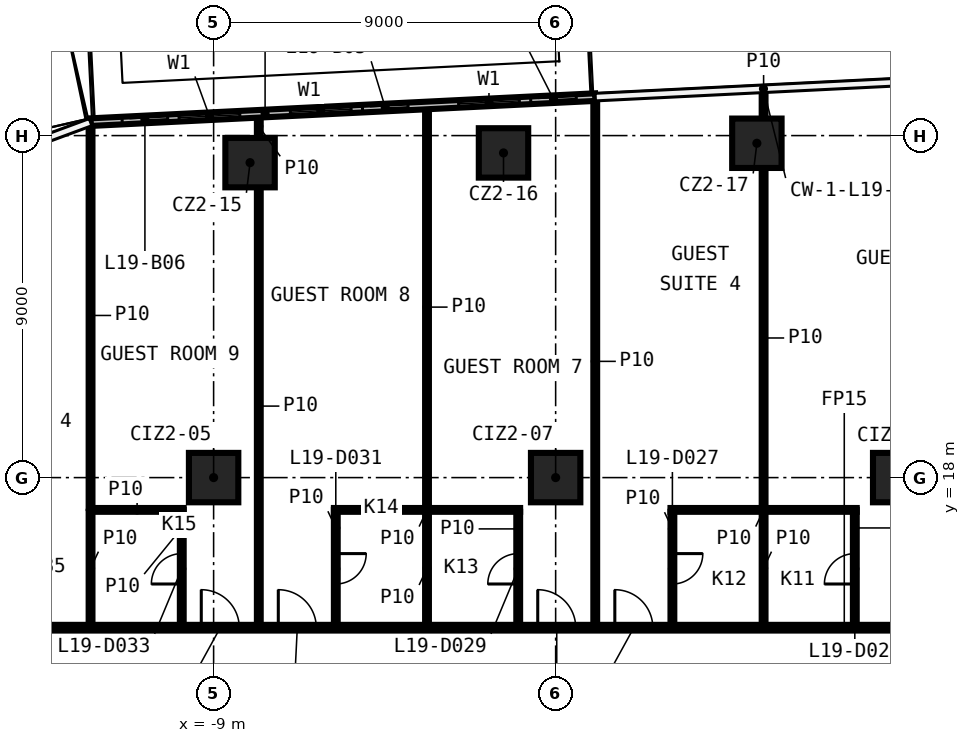
"""IFC4 building model, lengths in metres.
Left out: names, types, materials, properties, quantities, classifications, styles, units other than length and angle.
Written with IfcOpenShell. Run it as: python <this file> out.ifc"""

import sys

from ifc_helpers import new_model, si_unit, direction, frame, frame_2d, origin, origin_2d, place, context, subcontext, project, spatial, rectangle, extrude, element, fill, save


model = new_model("IFC4")
c1 = context("Model", 3, precision=1e-05, world=origin(), true_north=direction((0.0, 1.0)))
c2 = subcontext(c1, "Body", "Model", "MODEL_VIEW")
j1 = project(units=[si_unit("LENGTHUNIT", "METRE"), si_unit("PLANEANGLEUNIT", "RADIAN")], contexts=[c1])
p1 = place(None, origin())
s1 = spatial("IfcSite", under=j1, at=p1, CompositionType="ELEMENT")
p2 = place(p1, origin())
s2 = spatial("IfcBuilding", under=s1, at=p2, CompositionType="ELEMENT")
p3 = place(p2, frame((0.0, 0.0, 95.2)))
s3 = spatial("IfcBuildingStorey", under=s2, at=p3, CompositionType="ELEMENT", Elevation=95.2)
for number, where, z_axis, x_axis in (
    (1, (-8.041, 26.288, 0.0), (0.0, 0.0, 1.0), (1.0, 0.0, 0.0)),
    (2, (-1.372, 26.544, 0.0), (0.0, 0.0, 1.0), (1.0, 0.0, 0.0)),
    (3, (5.295, 26.798, 0.0), (0.0, 0.0, 1.0), (1.0, 0.0, 0.0)),
    (4, (-9.0, 18.0, 0.0), (0.0, 0.0, 1.0), (1.0, 0.0, 0.0)),
    (5, (0.0, 18.0, 0.0), (0.0, 0.0, 1.0), (1.0, 0.0, 0.0)),
    (6, (9.0, 18.0, 0.0), (0.0, 0.0, 1.0), (1.0, 0.0, 0.0)),
):
    element("IfcColumn", number, at=place(p3, frame(where, z_axis=z_axis, x_axis=x_axis)), inside=s3, PredefinedType="COLUMN", context=c2, shape_type="SweptSolid", body=[
        extrude(rectangle(XDim=1.3, YDim=1.3, at=origin_2d()), origin(), (0.0, 0.0, 1.0), 3.25),
    ])
p4 = place(p3, frame((-17.125, 14.05, 0.0), z_axis=(0.0, 0.0, 1.0), x_axis=(1.0, 0.0, 0.0)))
e7 = element("IfcWall", 7, at=p4, inside=s3, PredefinedType="PARTITIONING", context=c2, shape_type="SweptSolid", body=[
    extrude(rectangle(XDim=34.25, YDim=0.15, at=frame_2d((17.125, 0.0))), origin(), (0.0, 0.0, 1.0), 3.25),
])
p5 = place(p4, frame((29.757, 0.0, 0.0)))
e8 = element("IfcOpeningElement", 8, at=p5, cuts=e7, PredefinedType="OPENING", context=c2, shape_type="SweptSolid", body=[
    extrude(rectangle(XDim=1.0, YDim=2.1, at=frame_2d((0.5, 1.05))), frame((0.0, 0.085, 0.0), z_axis=(0.0, -1.0, 0.0), x_axis=(1.0, 0.0, 0.0)), (0.0, 0.0, 1.0), 0.17),
])
p6 = place(p4, frame((18.682, 0.0, 0.0)))
e9 = element("IfcOpeningElement", 9, at=p6, cuts=e7, PredefinedType="OPENING", context=c2, shape_type="SweptSolid", body=[
    extrude(rectangle(XDim=1.0, YDim=2.1, at=frame_2d((0.5, 1.05))), frame((0.0, 0.085, 0.0), z_axis=(0.0, -1.0, 0.0), x_axis=(1.0, 0.0, 0.0)), (0.0, 0.0, 1.0), 0.17),
])
p7 = place(p4, frame((16.654, 0.0, 0.0)))
e10 = element("IfcOpeningElement", 10, at=p7, cuts=e7, PredefinedType="OPENING", context=c2, shape_type="SweptSolid", body=[
    extrude(rectangle(XDim=1.0, YDim=2.1, at=frame_2d((0.5, 1.05))), frame((0.0, 0.085, 0.0), z_axis=(0.0, -1.0, 0.0), x_axis=(1.0, 0.0, 0.0)), (0.0, 0.0, 1.0), 0.17),
])
p8 = place(p4, frame((9.827, 0.0, 0.0)))
e11 = element("IfcOpeningElement", 11, at=p8, cuts=e7, PredefinedType="OPENING", context=c2, shape_type="SweptSolid", body=[
    extrude(rectangle(XDim=1.0, YDim=2.1, at=frame_2d((0.5, 1.05))), frame((0.0, 0.085, 0.0), z_axis=(0.0, -1.0, 0.0), x_axis=(1.0, 0.0, 0.0)), (0.0, 0.0, 1.0), 0.17),
])
p9 = place(p4, frame((7.8, 0.0, 0.0)))
e12 = element("IfcOpeningElement", 12, at=p9, cuts=e7, PredefinedType="OPENING", context=c2, shape_type="SweptSolid", body=[
    extrude(rectangle(XDim=1.0, YDim=2.1, at=frame_2d((0.5, 1.05))), frame((0.0, 0.085, 0.0), z_axis=(0.0, -1.0, 0.0), x_axis=(1.0, 0.0, 0.0)), (0.0, 0.0, 1.0), 0.17),
])
p10 = place(p4, frame((2.56, 0.0, 0.0)))
e13 = element("IfcOpeningElement", 13, at=p10, cuts=e7, PredefinedType="OPENING", context=c2, shape_type="SweptSolid", body=[
    extrude(rectangle(XDim=0.9, YDim=2.1, at=frame_2d((0.45, 1.05))), frame((0.0, 0.085, 0.0), z_axis=(0.0, -1.0, 0.0), x_axis=(1.0, 0.0, 0.0)), (0.0, 0.0, 1.0), 0.17),
])
p11 = place(p3, frame((-12.238, 17.15, 0.0), z_axis=(0.0, 0.0, 1.0), x_axis=(1.0, 0.0, 0.0)))
e14 = element("IfcWall", 14, at=p11, inside=s3, PredefinedType="PARTITIONING", context=c2, shape_type="SweptSolid", body=[
    extrude(rectangle(XDim=2.45, YDim=0.1, at=frame_2d((1.225, 0.0))), origin(), (0.0, 0.0, 1.0), 3.25),
])
for number, where, z_axis, x_axis in (
    (15, (-5.834, 17.15, 0.0), (0.0, 0.0, 1.0), (1.0, 0.0, 0.0)),
    (16, (3.022, 17.15, 0.0), (0.0, 0.0, 1.0), (1.0, 0.0, 0.0)),
):
    element("IfcWall", number, at=place(p3, frame(where, z_axis=z_axis, x_axis=x_axis)), inside=s3, PredefinedType="PARTITIONING", context=c2, shape_type="SweptSolid", body=[
        extrude(rectangle(XDim=4.9, YDim=0.1, at=frame_2d((2.45, 0.0))), origin(), (0.0, 0.0, 1.0), 3.25),
    ])
p12 = place(p3, frame((7.872, 14.125, 0.0), z_axis=(0.0, 0.0, 1.0), x_axis=(0.0, 1.0, 0.0)))
e17 = element("IfcWall", 17, at=p12, inside=s3, PredefinedType="PARTITIONING", context=c2, shape_type="SweptSolid", body=[
    extrude(rectangle(XDim=3.025, YDim=0.1, at=frame_2d((1.512, 0.0))), origin(), (0.0, 0.0, 1.0), 3.25),
])
p13 = place(p12, frame((1.075, 0.0, 0.0)))
e18 = element("IfcOpeningElement", 18, at=p13, cuts=e17, PredefinedType="OPENING", context=c2, shape_type="SweptSolid", body=[
    extrude(rectangle(XDim=0.8, YDim=2.1, at=frame_2d((0.4, 1.05))), frame((0.0, 0.06, 0.0), z_axis=(0.0, -1.0, 0.0), x_axis=(1.0, 0.0, 0.0)), (0.0, 0.0, 1.0), 0.12),
])
p14 = place(p3, frame((5.472, 14.125, 0.0), z_axis=(0.0, 0.0, 1.0), x_axis=(0.0, 1.0, 0.0)))
e19 = element("IfcWall", 19, at=p14, inside=s3, PredefinedType="PARTITIONING", context=c2, shape_type="SweptSolid", body=[
    extrude(rectangle(XDim=2.975, YDim=0.1, at=frame_2d((1.488, 0.0))), origin(), (0.0, 0.0, 1.0), 3.25),
])
p15 = place(p3, frame((5.472, 17.2, 0.0), z_axis=(0.0, 0.0, 1.0), x_axis=(0.0, 1.0, 0.0)))
e20 = element("IfcWall", 20, at=p15, inside=s3, PredefinedType="PARTITIONING", context=c2, shape_type="SweptSolid", body=[
    extrude(rectangle(XDim=8.948, YDim=0.1, at=frame_2d((4.474, 0.0))), origin(), (0.0, 0.0, 1.0), 3.25),
])
p16 = place(p3, frame((5.472, 27.448, 0.0), z_axis=(0.0, 0.0, 1.0), x_axis=(0.0, 1.0, 0.0)))
e21 = element("IfcWall", 21, at=p16, inside=s3, PredefinedType="PARTITIONING", context=c2, shape_type="SweptSolid", body=[
    extrude(rectangle(XDim=0.764, YDim=0.1, at=frame_2d((0.382, 0.0))), origin(), (0.0, 0.0, 1.0), 3.25),
])
p17 = place(p3, frame((3.072, 17.1, 0.0), z_axis=(0.0, 0.0, 1.0), x_axis=(0.0, -1.0, 0.0)))
e22 = element("IfcWall", 22, at=p17, inside=s3, PredefinedType="PARTITIONING", context=c2, shape_type="SweptSolid", body=[
    extrude(rectangle(XDim=2.975, YDim=0.1, at=frame_2d((1.488, 0.0))), origin(), (0.0, 0.0, 1.0), 3.25),
])
p18 = place(p17, frame((1.1, 0.0, 0.0)))
e23 = element("IfcOpeningElement", 23, at=p18, cuts=e22, PredefinedType="OPENING", context=c2, shape_type="SweptSolid", body=[
    extrude(rectangle(XDim=0.8, YDim=2.1, at=frame_2d((0.4, 1.05))), frame((0.0, 0.06, 0.0), z_axis=(0.0, -1.0, 0.0), x_axis=(1.0, 0.0, 0.0)), (0.0, 0.0, 1.0), 0.12),
])
p19 = place(p3, frame((1.042, 14.125, 0.0), z_axis=(0.0, 0.0, 1.0), x_axis=(0.0, 1.0, 0.0)))
e24 = element("IfcWall", 24, at=p19, inside=s3, PredefinedType="PARTITIONING", context=c2, shape_type="SweptSolid", body=[
    extrude(rectangle(XDim=13.867, YDim=0.1, at=frame_2d((6.934, 0.0))), origin(), (0.0, 0.0, 1.0), 3.25),
])
p20 = place(p3, frame((-0.985, 14.125, 0.0), z_axis=(0.0, 0.0, 1.0), x_axis=(0.0, 1.0, 0.0)))
e25 = element("IfcWall", 25, at=p20, inside=s3, PredefinedType="PARTITIONING", context=c2, shape_type="SweptSolid", body=[
    extrude(rectangle(XDim=2.975, YDim=0.1, at=frame_2d((1.488, 0.0))), origin(), (0.0, 0.0, 1.0), 3.25),
])
p21 = place(p20, frame((1.075, 0.0, 0.0)))
e26 = element("IfcOpeningElement", 26, at=p21, cuts=e25, PredefinedType="OPENING", context=c2, shape_type="SweptSolid", body=[
    extrude(rectangle(XDim=0.8, YDim=2.1, at=frame_2d((0.4, 1.05))), frame((0.0, 0.06, 0.0), z_axis=(0.0, -1.0, 0.0), x_axis=(1.0, 0.0, 0.0)), (0.0, 0.0, 1.0), 0.12),
])
p22 = place(p3, frame((-3.385, 14.125, 0.0), z_axis=(0.0, 0.0, 1.0), x_axis=(0.0, 1.0, 0.0)))
e27 = element("IfcWall", 27, at=p22, inside=s3, PredefinedType="PARTITIONING", context=c2, shape_type="SweptSolid", body=[
    extrude(rectangle(XDim=2.975, YDim=0.1, at=frame_2d((1.488, 0.0))), origin(), (0.0, 0.0, 1.0), 3.25),
])
p23 = place(p3, frame((-3.385, 17.2, 0.0), z_axis=(0.0, 0.0, 1.0), x_axis=(0.0, 1.0, 0.0)))
e28 = element("IfcWall", 28, at=p23, inside=s3, PredefinedType="PARTITIONING", context=c2, shape_type="SweptSolid", body=[
    extrude(rectangle(XDim=10.573, YDim=0.1, at=frame_2d((5.287, 0.0))), origin(), (0.0, 0.0, 1.0), 3.25),
])
p24 = place(p3, frame((-5.785, 17.15, 0.0), z_axis=(0.0, 0.0, 1.0), x_axis=(0.0, -1.0, 0.0)))
e29 = element("IfcWall", 29, at=p24, inside=s3, PredefinedType="PARTITIONING", context=c2, shape_type="SweptSolid", body=[
    extrude(rectangle(XDim=3.025, YDim=0.1, at=frame_2d((1.512, 0.0))), origin(), (0.0, 0.0, 1.0), 3.25),
])
p25 = place(p24, frame((1.15, 0.0, 0.0)))
e30 = element("IfcOpeningElement", 30, at=p25, cuts=e29, PredefinedType="OPENING", context=c2, shape_type="SweptSolid", body=[
    extrude(rectangle(XDim=0.8, YDim=2.1, at=frame_2d((0.4, 1.05))), frame((0.0, 0.06, 0.0), z_axis=(0.0, -1.0, 0.0), x_axis=(1.0, 0.0, 0.0)), (0.0, 0.0, 1.0), 0.12),
])
p26 = place(p3, frame((-7.811, 14.125, 0.0), z_axis=(0.0, 0.0, 1.0), x_axis=(0.0, 1.0, 0.0)))
e31 = element("IfcWall", 31, at=p26, inside=s3, PredefinedType="PARTITIONING", context=c2, shape_type="SweptSolid", body=[
    extrude(rectangle(XDim=11.513, YDim=0.1, at=frame_2d((5.756, 0.0))), origin(), (0.0, 0.0, 1.0), 3.25),
])
p27 = place(p3, frame((-7.811, 26.938, 0.0), z_axis=(0.0, 0.0, 1.0), x_axis=(0.0, 1.0, 0.0)))
e32 = element("IfcWall", 32, at=p27, inside=s3, PredefinedType="PARTITIONING", context=c2, shape_type="SweptSolid", body=[
    extrude(rectangle(XDim=0.615, YDim=0.1, at=frame_2d((0.308, 0.0))), origin(), (0.0, 0.0, 1.0), 3.25),
])
p28 = place(p3, frame((-9.838, 14.125, 0.0), z_axis=(0.0, 0.0, 1.0), x_axis=(0.0, 1.0, 0.0)))
e33 = element("IfcWall", 33, at=p28, inside=s3, PredefinedType="PARTITIONING", context=c2, shape_type="SweptSolid", body=[
    extrude(rectangle(XDim=3.025, YDim=0.1, at=frame_2d((1.512, 0.0))), origin(), (0.0, 0.0, 1.0), 3.25),
])
p29 = place(p28, frame((1.075, 0.0, 0.0)))
e34 = element("IfcOpeningElement", 34, at=p29, cuts=e33, PredefinedType="OPENING", context=c2, shape_type="SweptSolid", body=[
    extrude(rectangle(XDim=0.8, YDim=2.1, at=frame_2d((0.4, 1.05))), frame((0.0, 0.06, 0.0), z_axis=(0.0, -1.0, 0.0), x_axis=(1.0, 0.0, 0.0)), (0.0, 0.0, 1.0), 0.12),
])
p30 = place(p3, frame((-12.238, 14.125, 0.0), z_axis=(0.0, 0.0, 1.0), x_axis=(0.0, 1.0, 0.0)))
e35 = element("IfcWall", 35, at=p30, inside=s3, PredefinedType="PARTITIONING", context=c2, shape_type="SweptSolid", body=[
    extrude(rectangle(XDim=2.975, YDim=0.1, at=frame_2d((1.488, 0.0))), origin(), (0.0, 0.0, 1.0), 3.25),
])
p31 = place(p3, frame((-12.238, 17.2, 0.0), z_axis=(0.0, 0.0, 1.0), x_axis=(0.0, 1.0, 0.0)))
e36 = element("IfcWall", 36, at=p31, inside=s3, PredefinedType="PARTITIONING", context=c2, shape_type="SweptSolid", body=[
    extrude(rectangle(XDim=10.133, YDim=0.1, at=frame_2d((5.067, 0.0))), origin(), (0.0, 0.0, 1.0), 3.25),
])
p32 = place(p3, frame((1.042, 28.012, 0.0), z_axis=(0.0, 0.0, 1.0), x_axis=(-0.998772222794, -0.049538338427, 0.0)))
e37 = element("IfcWall", 37, at=p32, inside=s3, PredefinedType="SOLIDWALL", context=c2, shape_type="SweptSolid", body=[
    extrude(rectangle(XDim=13.297, YDim=0.2, at=frame_2d((6.648, 0.0))), origin(), (0.0, 0.0, 1.0), 3.25),
])
p33 = place(p32, frame((2.0, 0.0, 0.6)))
e38 = element("IfcOpeningElement", 38, at=p33, cuts=e37, PredefinedType="OPENING", context=c2, shape_type="SweptSolid", body=[
    extrude(rectangle(XDim=1.6, YDim=2.4, at=frame_2d((0.8, 1.2))), frame((0.0, 0.11, 0.0), z_axis=(0.0, -1.0, 0.0), x_axis=(1.0, 0.0, 0.0)), (0.0, 0.0, 1.0), 0.22),
])
p34 = place(p32, frame((0.5, 0.0, 0.0)))
e39 = element("IfcOpeningElement", 39, at=p34, cuts=e37, PredefinedType="OPENING", context=c2, shape_type="SweptSolid", body=[
    extrude(rectangle(XDim=1.2, YDim=2.4, at=frame_2d((0.6, 1.2))), frame((0.0, 0.11, 0.0), z_axis=(0.0, -1.0, 0.0), x_axis=(1.0, 0.0, 0.0)), (0.0, 0.0, 1.0), 0.22),
])
p35 = place(p32, frame((6.432, 0.0, 0.6)))
e40 = element("IfcOpeningElement", 40, at=p35, cuts=e37, PredefinedType="OPENING", context=c2, shape_type="SweptSolid", body=[
    extrude(rectangle(XDim=1.6, YDim=2.4, at=frame_2d((0.8, 1.2))), frame((0.0, 0.11, 0.0), z_axis=(0.0, -1.0, 0.0), x_axis=(1.0, 0.0, 0.0)), (0.0, 0.0, 1.0), 0.22),
])
p36 = place(p32, frame((4.932, 0.0, 0.0)))
e41 = element("IfcOpeningElement", 41, at=p36, cuts=e37, PredefinedType="OPENING", context=c2, shape_type="SweptSolid", body=[
    extrude(rectangle(XDim=1.2, YDim=2.4, at=frame_2d((0.6, 1.2))), frame((0.0, 0.11, 0.0), z_axis=(0.0, -1.0, 0.0), x_axis=(1.0, 0.0, 0.0)), (0.0, 0.0, 1.0), 0.22),
])
p37 = place(p32, frame((9.365, 0.0, 0.6)))
e42 = element("IfcOpeningElement", 42, at=p37, cuts=e37, PredefinedType="OPENING", context=c2, shape_type="SweptSolid", body=[
    extrude(rectangle(XDim=1.6, YDim=2.4, at=frame_2d((0.8, 1.2))), frame((0.0, 0.11, 0.0), z_axis=(0.0, -1.0, 0.0), x_axis=(1.0, 0.0, 0.0)), (0.0, 0.0, 1.0), 0.22),
])
p38 = place(p32, frame((11.264, 0.0, 0.0)))
e43 = element("IfcOpeningElement", 43, at=p38, cuts=e37, PredefinedType="OPENING", context=c2, shape_type="SweptSolid", body=[
    extrude(rectangle(XDim=1.2, YDim=2.4, at=frame_2d((0.6, 1.2))), frame((0.0, 0.11, 0.0), z_axis=(0.0, -1.0, 0.0), x_axis=(1.0, 0.0, 0.0)), (0.0, 0.0, 1.0), 0.22),
])
p39 = place(p13, origin())
e44 = element("IfcDoor", 44, at=p39, inside=s3, OperationType="SINGLE_SWING_RIGHT", PredefinedType="DOOR", context=c2, shape_type="SweptSolid", body=[
    extrude(rectangle(XDim=0.8, YDim=2.1, at=frame_2d((0.4, 1.05))), frame((0.0, 0.025, 0.0), z_axis=(0.0, -1.0, 0.0), x_axis=(1.0, 0.0, 0.0)), (0.0, 0.0, 1.0), 0.05),
])
fill(e18, e44)
p40 = place(p18, origin())
e45 = element("IfcDoor", 45, at=p40, inside=s3, OperationType="SINGLE_SWING_LEFT", PredefinedType="DOOR", context=c2, shape_type="SweptSolid", body=[
    extrude(rectangle(XDim=0.8, YDim=2.1, at=frame_2d((0.4, 1.05))), frame((0.0, 0.025, 0.0), z_axis=(0.0, -1.0, 0.0), x_axis=(1.0, 0.0, 0.0)), (0.0, 0.0, 1.0), 0.05),
])
fill(e23, e45)
p41 = place(p6, origin())
e46 = element("IfcDoor", 46, at=p41, inside=s3, OperationType="SINGLE_SWING_RIGHT", PredefinedType="DOOR", context=c2, shape_type="SweptSolid", body=[
    extrude(rectangle(XDim=1.0, YDim=2.1, at=frame_2d((0.5, 1.05))), frame((0.0, 0.025, 0.0), z_axis=(0.0, -1.0, 0.0), x_axis=(1.0, 0.0, 0.0)), (0.0, 0.0, 1.0), 0.05),
])
fill(e9, e46)
p42 = place(p21, origin())
e47 = element("IfcDoor", 47, at=p42, inside=s3, OperationType="SINGLE_SWING_RIGHT", PredefinedType="DOOR", context=c2, shape_type="SweptSolid", body=[
    extrude(rectangle(XDim=0.8, YDim=2.1, at=frame_2d((0.4, 1.05))), frame((0.0, 0.025, 0.0), z_axis=(0.0, -1.0, 0.0), x_axis=(1.0, 0.0, 0.0)), (0.0, 0.0, 1.0), 0.05),
])
fill(e26, e47)
p43 = place(p7, origin())
e48 = element("IfcDoor", 48, at=p43, inside=s3, OperationType="SINGLE_SWING_LEFT", PredefinedType="DOOR", context=c2, shape_type="SweptSolid", body=[
    extrude(rectangle(XDim=1.0, YDim=2.1, at=frame_2d((0.5, 1.05))), frame((0.0, 0.025, 0.0), z_axis=(0.0, -1.0, 0.0), x_axis=(1.0, 0.0, 0.0)), (0.0, 0.0, 1.0), 0.05),
])
fill(e10, e48)
p44 = place(p25, origin())
e49 = element("IfcDoor", 49, at=p44, inside=s3, OperationType="SINGLE_SWING_LEFT", PredefinedType="DOOR", context=c2, shape_type="SweptSolid", body=[
    extrude(rectangle(XDim=0.8, YDim=2.1, at=frame_2d((0.4, 1.05))), frame((0.0, 0.025, 0.0), z_axis=(0.0, -1.0, 0.0), x_axis=(1.0, 0.0, 0.0)), (0.0, 0.0, 1.0), 0.05),
])
fill(e30, e49)
p45 = place(p8, origin())
e50 = element("IfcDoor", 50, at=p45, inside=s3, OperationType="SINGLE_SWING_RIGHT", PredefinedType="DOOR", context=c2, shape_type="SweptSolid", body=[
    extrude(rectangle(XDim=1.0, YDim=2.1, at=frame_2d((0.5, 1.05))), frame((0.0, 0.025, 0.0), z_axis=(0.0, -1.0, 0.0), x_axis=(1.0, 0.0, 0.0)), (0.0, 0.0, 1.0), 0.05),
])
fill(e11, e50)
p46 = place(p29, origin())
e51 = element("IfcDoor", 51, at=p46, inside=s3, OperationType="SINGLE_SWING_RIGHT", PredefinedType="DOOR", context=c2, shape_type="SweptSolid", body=[
    extrude(rectangle(XDim=0.8, YDim=2.1, at=frame_2d((0.4, 1.05))), frame((0.0, 0.025, 0.0), z_axis=(0.0, -1.0, 0.0), x_axis=(1.0, 0.0, 0.0)), (0.0, 0.0, 1.0), 0.05),
])
fill(e34, e51)
p47 = place(p9, origin())
e52 = element("IfcDoor", 52, at=p47, inside=s3, OperationType="SINGLE_SWING_LEFT", PredefinedType="DOOR", context=c2, shape_type="SweptSolid", body=[
    extrude(rectangle(XDim=1.0, YDim=2.1, at=frame_2d((0.5, 1.05))), frame((0.0, 0.025, 0.0), z_axis=(0.0, -1.0, 0.0), x_axis=(1.0, 0.0, 0.0)), (0.0, 0.0, 1.0), 0.05),
])
fill(e12, e52)
p48 = place(p33, origin())
e53 = element("IfcWindow", 53, at=p48, inside=s3, PartitioningType="SINGLE_PANEL", PredefinedType="WINDOW", context=c2, shape_type="SweptSolid", body=[
    extrude(rectangle(XDim=1.6, YDim=2.4, at=frame_2d((0.8, 1.2))), frame((0.0, 0.03, 0.0), z_axis=(0.0, -1.0, 0.0), x_axis=(1.0, 0.0, 0.0)), (0.0, 0.0, 1.0), 0.06),
])
fill(e38, e53)
p49 = place(p34, origin())
e54 = element("IfcDoor", 54, at=p49, inside=s3, OperationType="SLIDING_TO_LEFT", PredefinedType="DOOR", context=c2, shape_type="SweptSolid", body=[
    extrude(rectangle(XDim=1.2, YDim=2.4, at=frame_2d((0.6, 1.2))), frame((0.0, 0.025, 0.0), z_axis=(0.0, -1.0, 0.0), x_axis=(1.0, 0.0, 0.0)), (0.0, 0.0, 1.0), 0.05),
])
fill(e39, e54)
p50 = place(p35, origin())
e55 = element("IfcWindow", 55, at=p50, inside=s3, PartitioningType="SINGLE_PANEL", PredefinedType="WINDOW", context=c2, shape_type="SweptSolid", body=[
    extrude(rectangle(XDim=1.6, YDim=2.4, at=frame_2d((0.8, 1.2))), frame((0.0, 0.03, 0.0), z_axis=(0.0, -1.0, 0.0), x_axis=(1.0, 0.0, 0.0)), (0.0, 0.0, 1.0), 0.06),
])
fill(e40, e55)
p51 = place(p36, origin())
e56 = element("IfcDoor", 56, at=p51, inside=s3, OperationType="SLIDING_TO_LEFT", PredefinedType="DOOR", context=c2, shape_type="SweptSolid", body=[
    extrude(rectangle(XDim=1.2, YDim=2.4, at=frame_2d((0.6, 1.2))), frame((0.0, 0.025, 0.0), z_axis=(0.0, -1.0, 0.0), x_axis=(1.0, 0.0, 0.0)), (0.0, 0.0, 1.0), 0.05),
])
fill(e41, e56)
p52 = place(p37, origin())
e57 = element("IfcWindow", 57, at=p52, inside=s3, PartitioningType="SINGLE_PANEL", PredefinedType="WINDOW", context=c2, shape_type="SweptSolid", body=[
    extrude(rectangle(XDim=1.6, YDim=2.4, at=frame_2d((0.8, 1.2))), frame((0.0, 0.03, 0.0), z_axis=(0.0, -1.0, 0.0), x_axis=(1.0, 0.0, 0.0)), (0.0, 0.0, 1.0), 0.06),
])
fill(e42, e57)
p53 = place(p38, origin())
e58 = element("IfcDoor", 58, at=p53, inside=s3, OperationType="SLIDING_TO_LEFT", PredefinedType="DOOR", context=c2, shape_type="SweptSolid", body=[
    extrude(rectangle(XDim=1.2, YDim=2.4, at=frame_2d((0.6, 1.2))), frame((0.0, 0.025, 0.0), z_axis=(0.0, -1.0, 0.0), x_axis=(1.0, 0.0, 0.0)), (0.0, 0.0, 1.0), 0.05),
])
fill(e43, e58)
save(model, sys.argv[1])
